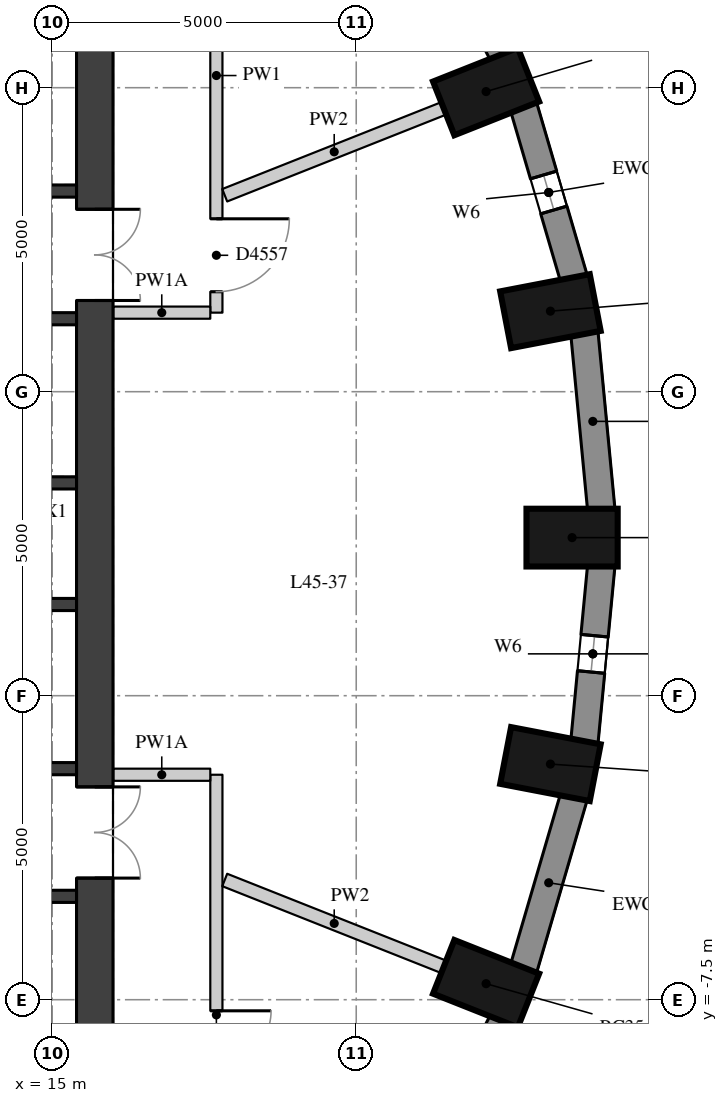
"""IFC4 building model, lengths in metres.
Left out: names, types, materials, properties, quantities, classifications, styles, units other than length and angle.
Written with IfcOpenShell. Run it as: python <this file> out.ifc"""

import sys

from ifc_helpers import new_model, si_unit, direction, frame, frame_2d, origin, origin_2d, place, context, subcontext, project, spatial, rectangle, extrude, element, fill, save


model = new_model("IFC4")
c1 = context("Model", 3, precision=1e-05, world=origin(), true_north=direction((0.0, 1.0)))
c2 = subcontext(c1, "Body", "Model", "MODEL_VIEW")
j1 = project(units=[si_unit("LENGTHUNIT", "METRE"), si_unit("PLANEANGLEUNIT", "RADIAN")], contexts=[c1])
p1 = place(None, origin())
s1 = spatial("IfcSite", under=j1, at=p1, CompositionType="ELEMENT")
p2 = place(p1, origin())
s2 = spatial("IfcBuilding", under=s1, at=p2, CompositionType="ELEMENT")
p3 = place(p2, frame((0.0, 0.0, 161.6)))
s3 = spatial("IfcBuildingStorey", under=s2, at=p3, CompositionType="ELEMENT", Elevation=161.6)
for number, where, z_axis, x_axis in (
    (1, (23.55, 0.1, 0.0), (0.0, 0.0, 1.0), (1.0, 0.0, 0.0)),
    (2, (23.194, 3.825, 0.0), (0.0, 0.0, 1.0), (0.982, 0.189, 0.0)),
    (3, (22.136, 7.436, 0.0), (0.0, 0.0, 1.0), (0.93, 0.369, 0.0)),
    (4, (22.136, -7.236, 0.0), (0.0, 0.0, 1.0), (0.93, -0.369, 0.0)),
    (5, (23.194, -3.625, 0.0), (0.0, 0.0, 1.0), (0.982, -0.189, 0.0)),
):
    element("IfcColumn", number, at=place(p3, frame(where, z_axis=z_axis, x_axis=x_axis)), inside=s3, PredefinedType="COLUMN", context=c2, shape_type="SweptSolid", body=[
        extrude(rectangle(XDim=1.5, YDim=0.95, at=origin_2d()), origin(), (0.0, 0.0, 1.0), 3.3),
    ])
p4 = place(p3, frame((24.031, 0.555, 0.0), z_axis=(0.0, 0.0, 1.0), x_axis=(-0.095265737322, 0.995451876935, 0.0)))
e6 = element("IfcWall", 6, at=p4, inside=s3, PredefinedType="SOLIDWALL", context=c2, shape_type="SweptSolid", body=[
    extrude(rectangle(XDim=2.927, YDim=0.45, at=frame_2d((1.463, 0.0))), origin(), (0.0, 0.0, 1.0), 3.02),
])
p5 = place(p3, frame((23.58, 4.362, 0.0), z_axis=(0.0, 0.0, 1.0), x_axis=(-0.281049481624, 0.959693278542, 0.0)))
e7 = element("IfcWall", 7, at=p5, inside=s3, PredefinedType="SOLIDWALL", context=c2, shape_type="SweptSolid", body=[
    extrude(rectangle(XDim=2.948, YDim=0.45, at=frame_2d((1.474, 0.0))), origin(), (0.0, 0.0, 1.0), 3.02),
])
p6 = place(p5, frame((1.174, 0.0, 0.4)))
e8 = element("IfcOpeningElement", 8, at=p6, cuts=e7, PredefinedType="OPENING", context=c2, shape_type="SweptSolid", body=[
    extrude(rectangle(XDim=0.6, YDim=1.75, at=frame_2d((0.3, 0.875))), frame((0.0, 0.235, 0.0), z_axis=(0.0, -1.0, 0.0), x_axis=(1.0, 0.0, 0.0)), (0.0, 0.0, 1.0), 0.47),
])
p7 = place(p3, frame((22.415, 8.037, 0.0), z_axis=(0.0, 0.0, 1.0), x_axis=(-0.454133999889, 0.890933392653, 0.0)))
e9 = element("IfcWall", 9, at=p7, inside=s3, PredefinedType="SOLIDWALL", context=c2, shape_type="SweptSolid", body=[
    extrude(rectangle(XDim=2.986, YDim=0.45, at=frame_2d((1.493, 0.0))), origin(), (0.0, 0.0, 1.0), 3.02),
])
p8 = place(p3, frame((21.059, -10.497, 0.0), z_axis=(0.0, 0.0, 1.0), x_axis=(0.454133999889, 0.890933392653, 0.0)))
e10 = element("IfcWall", 10, at=p8, inside=s3, PredefinedType="SOLIDWALL", context=c2, shape_type="SweptSolid", body=[
    extrude(rectangle(XDim=2.986, YDim=0.45, at=frame_2d((1.493, 0.0))), origin(), (0.0, 0.0, 1.0), 3.02),
])
p9 = place(p8, frame((1.193, 0.0, 0.4)))
e11 = element("IfcOpeningElement", 11, at=p9, cuts=e10, PredefinedType="OPENING", context=c2, shape_type="SweptSolid", body=[
    extrude(rectangle(XDim=0.6, YDim=1.75, at=frame_2d((0.3, 0.875))), frame((0.0, 0.235, 0.0), z_axis=(0.0, -1.0, 0.0), x_axis=(1.0, 0.0, 0.0)), (0.0, 0.0, 1.0), 0.47),
])
p10 = place(p3, frame((22.751, -6.991, 0.0), z_axis=(0.0, 0.0, 1.0), x_axis=(0.281049481624, 0.959693278542, 0.0)))
e12 = element("IfcWall", 12, at=p10, inside=s3, PredefinedType="SOLIDWALL", context=c2, shape_type="SweptSolid", body=[
    extrude(rectangle(XDim=2.948, YDim=0.45, at=frame_2d((1.474, 0.0))), origin(), (0.0, 0.0, 1.0), 3.02),
])
p11 = place(p3, frame((23.752, -3.269, 0.0), z_axis=(0.0, 0.0, 1.0), x_axis=(0.095257827044, 0.995452633924, 0.0)))
e13 = element("IfcWall", 13, at=p11, inside=s3, PredefinedType="SOLIDWALL", context=c2, shape_type="SweptSolid", body=[
    extrude(rectangle(XDim=2.927, YDim=0.45, at=frame_2d((1.463, 0.0))), origin(), (0.0, 0.0, 1.0), 3.02),
])
p12 = place(p11, frame((1.163, 0.0, 0.4)))
e14 = element("IfcOpeningElement", 14, at=p12, cuts=e13, PredefinedType="OPENING", context=c2, shape_type="SweptSolid", body=[
    extrude(rectangle(XDim=0.6, YDim=1.75, at=frame_2d((0.3, 0.875))), frame((0.0, 0.235, 0.0), z_axis=(0.0, -1.0, 0.0), x_axis=(1.0, 0.0, 0.0)), (0.0, 0.0, 1.0), 0.47),
])
p13 = place(p3, frame((15.7, -9.4, 0.0), z_axis=(0.0, 0.0, 1.0), x_axis=(0.0, 1.0, 0.0)))
e15 = element("IfcWall", 15, at=p13, inside=s3, PredefinedType="SHEAR", context=c2, shape_type="SweptSolid", body=[
    extrude(rectangle(XDim=18.8, YDim=0.6, at=frame_2d((9.4, 0.0))), origin(), (0.0, 0.0, 1.0), 3.02),
])
p14 = place(p13, frame((13.4, 0.0, 0.0)))
e16 = element("IfcOpeningElement", 16, at=p14, cuts=e15, PredefinedType="OPENING", context=c2, shape_type="SweptSolid", body=[
    extrude(rectangle(XDim=1.5, YDim=2.1, at=frame_2d((0.75, 1.05))), frame((0.0, 0.31, 0.0), z_axis=(0.0, -1.0, 0.0), x_axis=(1.0, 0.0, 0.0)), (0.0, 0.0, 1.0), 0.62),
])
p15 = place(p13, frame((3.9, 0.0, 0.0)))
e17 = element("IfcOpeningElement", 17, at=p15, cuts=e15, PredefinedType="OPENING", context=c2, shape_type="SweptSolid", body=[
    extrude(rectangle(XDim=1.5, YDim=2.1, at=frame_2d((0.75, 1.05))), frame((0.0, 0.31, 0.0), z_axis=(0.0, -1.0, 0.0), x_axis=(1.0, 0.0, 0.0)), (0.0, 0.0, 1.0), 0.62),
])
p16 = place(p3, frame((4.6, 5.8, 0.0), z_axis=(0.0, 0.0, 1.0), x_axis=(1.0, 0.0, 0.0)))
e18 = element("IfcWall", 18, at=p16, inside=s3, PredefinedType="SHEAR", context=c2, shape_type="SweptSolid", body=[
    extrude(rectangle(XDim=10.8, YDim=0.2, at=frame_2d((5.4, 0.0))), origin(), (0.0, 0.0, 1.0), 3.02),
])
p17 = place(p16, frame((7.05, 0.0, 0.0)))
e19 = element("IfcOpeningElement", 19, at=p17, cuts=e18, PredefinedType="OPENING", context=c2, shape_type="SweptSolid", body=[
    extrude(rectangle(XDim=1.1, YDim=2.1, at=frame_2d((0.55, 1.05))), frame((0.0, 0.11, 0.0), z_axis=(0.0, -1.0, 0.0), x_axis=(1.0, 0.0, 0.0)), (0.0, 0.0, 1.0), 0.22),
])
p18 = place(p16, frame((9.05, 0.0, 0.0)))
e20 = element("IfcOpeningElement", 20, at=p18, cuts=e18, PredefinedType="OPENING", context=c2, shape_type="SweptSolid", body=[
    extrude(rectangle(XDim=1.1, YDim=2.1, at=frame_2d((0.55, 1.05))), frame((0.0, 0.11, 0.0), z_axis=(0.0, -1.0, 0.0), x_axis=(1.0, 0.0, 0.0)), (0.0, 0.0, 1.0), 0.22),
])
p19 = place(p3, frame((4.6, 3.7, 0.0), z_axis=(0.0, 0.0, 1.0), x_axis=(1.0, 0.0, 0.0)))
e21 = element("IfcWall", 21, at=p19, inside=s3, PredefinedType="SHEAR", context=c2, shape_type="SweptSolid", body=[
    extrude(rectangle(XDim=10.8, YDim=0.2, at=frame_2d((5.4, 0.0))), origin(), (0.0, 0.0, 1.0), 3.02),
])
p20 = place(p19, frame((6.6, 0.0, 0.0)))
e22 = element("IfcOpeningElement", 22, at=p20, cuts=e21, PredefinedType="OPENING", context=c2, shape_type="SweptSolid", body=[
    extrude(rectangle(XDim=1.1, YDim=2.1, at=frame_2d((0.55, 1.05))), frame((0.0, 0.11, 0.0), z_axis=(0.0, -1.0, 0.0), x_axis=(1.0, 0.0, 0.0)), (0.0, 0.0, 1.0), 0.22),
])
p21 = place(p19, frame((8.9, 0.0, 0.0)))
e23 = element("IfcOpeningElement", 23, at=p21, cuts=e21, PredefinedType="OPENING", context=c2, shape_type="SweptSolid", body=[
    extrude(rectangle(XDim=1.1, YDim=2.1, at=frame_2d((0.55, 1.05))), frame((0.0, 0.11, 0.0), z_axis=(0.0, -1.0, 0.0), x_axis=(1.0, 0.0, 0.0)), (0.0, 0.0, 1.0), 0.22),
])
for number, where, z_axis, x_axis in (
    (24, (4.6, 1.0, 0.0), (0.0, 0.0, 1.0), (1.0, 0.0, 0.0)),
    (25, (4.6, -1.0, 0.0), (0.0, 0.0, 1.0), (1.0, 0.0, 0.0)),
):
    element("IfcWall", number, at=place(p3, frame(where, z_axis=z_axis, x_axis=x_axis)), inside=s3, PredefinedType="SHEAR", context=c2, shape_type="SweptSolid", body=[
        extrude(rectangle(XDim=10.8, YDim=0.2, at=frame_2d((5.4, 0.0))), origin(), (0.0, 0.0, 1.0), 3.02),
    ])
p22 = place(p3, frame((4.6, -3.7, 0.0), z_axis=(0.0, 0.0, 1.0), x_axis=(1.0, 0.0, 0.0)))
e26 = element("IfcWall", 26, at=p22, inside=s3, PredefinedType="SHEAR", context=c2, shape_type="SweptSolid", body=[
    extrude(rectangle(XDim=10.8, YDim=0.2, at=frame_2d((5.4, 0.0))), origin(), (0.0, 0.0, 1.0), 3.02),
])
p23 = place(p22, frame((6.6, 0.0, 0.0)))
e27 = element("IfcOpeningElement", 27, at=p23, cuts=e26, PredefinedType="OPENING", context=c2, shape_type="SweptSolid", body=[
    extrude(rectangle(XDim=1.1, YDim=2.1, at=frame_2d((0.55, 1.05))), frame((0.0, 0.11, 0.0), z_axis=(0.0, -1.0, 0.0), x_axis=(1.0, 0.0, 0.0)), (0.0, 0.0, 1.0), 0.22),
])
p24 = place(p22, frame((8.9, 0.0, 0.0)))
e28 = element("IfcOpeningElement", 28, at=p24, cuts=e26, PredefinedType="OPENING", context=c2, shape_type="SweptSolid", body=[
    extrude(rectangle(XDim=1.1, YDim=2.1, at=frame_2d((0.55, 1.05))), frame((0.0, 0.11, 0.0), z_axis=(0.0, -1.0, 0.0), x_axis=(1.0, 0.0, 0.0)), (0.0, 0.0, 1.0), 0.22),
])
p25 = place(p3, frame((4.6, -5.8, 0.0), z_axis=(0.0, 0.0, 1.0), x_axis=(1.0, 0.0, 0.0)))
e29 = element("IfcWall", 29, at=p25, inside=s3, PredefinedType="SHEAR", context=c2, shape_type="SweptSolid", body=[
    extrude(rectangle(XDim=10.8, YDim=0.2, at=frame_2d((5.4, 0.0))), origin(), (0.0, 0.0, 1.0), 3.02),
])
p26 = place(p3, frame((17.7, -3.8, 0.0), z_axis=(0.0, 0.0, 1.0), x_axis=(0.0, -1.0, 0.0)))
e30 = element("IfcWall", 30, at=p26, inside=s3, PredefinedType="PARTITIONING", context=c2, shape_type="SweptSolid", body=[
    extrude(rectangle(XDim=7.9, YDim=0.2, at=frame_2d((3.95, 0.0))), origin(), (0.0, 0.0, 1.0), 3.02),
])
p27 = place(p26, frame((3.883, 0.0, 0.0)))
e31 = element("IfcOpeningElement", 31, at=p27, cuts=e30, PredefinedType="OPENING", context=c2, shape_type="SweptSolid", body=[
    extrude(rectangle(XDim=1.8, YDim=2.1, at=frame_2d((0.9, 1.05))), frame((0.0, 0.11, 0.0), z_axis=(0.0, -1.0, 0.0), x_axis=(1.0, 0.0, 0.0)), (0.0, 0.0, 1.0), 0.22),
])
p28 = place(p3, frame((17.7, 11.6, 0.0), z_axis=(0.0, 0.0, 1.0), x_axis=(0.0, -1.0, 0.0)))
e32 = element("IfcWall", 32, at=p28, inside=s3, PredefinedType="PARTITIONING", context=c2, shape_type="SweptSolid", body=[
    extrude(rectangle(XDim=7.8, YDim=0.2, at=frame_2d((3.9, 0.0))), origin(), (0.0, 0.0, 1.0), 3.02),
])
p29 = place(p28, frame((6.256, 0.0, 0.0)))
e33 = element("IfcOpeningElement", 33, at=p29, cuts=e32, PredefinedType="OPENING", context=c2, shape_type="SweptSolid", body=[
    extrude(rectangle(XDim=1.2, YDim=2.1, at=frame_2d((0.6, 1.05))), frame((0.0, 0.11, 0.0), z_axis=(0.0, -1.0, 0.0), x_axis=(1.0, 0.0, 0.0)), (0.0, 0.0, 1.0), 0.22),
])
for number, where, z_axis, x_axis in (
    (34, (17.6, 3.8, 0.0), (0.0, 0.0, 1.0), (-1.0, 0.0, 0.0)),
    (35, (16.004, -3.8, 0.0), (0.0, 0.0, 1.0), (1.0, 0.0, 0.0)),
):
    element("IfcWall", number, at=place(p3, frame(where, z_axis=z_axis, x_axis=x_axis)), inside=s3, PredefinedType="PARTITIONING", context=c2, shape_type="SweptSolid", body=[
        extrude(rectangle(XDim=1.596, YDim=0.2, at=frame_2d((0.798, 0.0))), origin(), (0.0, 0.0, 1.0), 2.57),
    ])
for number, where, z_axis, x_axis in (
    (36, (21.439, 7.16, 0.0), (0.0, 0.0, 1.0), (-0.93, -0.369, 0.0)),
    (37, (21.439, -6.96, 0.0), (0.0, 0.0, 1.0), (-0.93, 0.369, 0.0)),
):
    element("IfcWall", number, at=place(p3, frame(where, z_axis=z_axis, x_axis=x_axis)), inside=s3, PredefinedType="PARTITIONING", context=c2, shape_type="SweptSolid", body=[
        extrude(rectangle(XDim=3.875, YDim=0.22, at=frame_2d((1.938, 0.0))), origin(), (0.0, 0.0, 1.0), 3.02),
    ])
p30 = place(p6, origin())
e38 = element("IfcWindow", 38, at=p30, inside=s3, PartitioningType="SINGLE_PANEL", PredefinedType="WINDOW", context=c2, shape_type="SweptSolid", body=[
    extrude(rectangle(XDim=0.6, YDim=1.75, at=frame_2d((0.3, 0.875))), frame((0.0, 0.035, 0.0), z_axis=(0.0, -1.0, 0.0), x_axis=(1.0, 0.0, 0.0)), (0.0, 0.0, 1.0), 0.06),
])
fill(e8, e38)
p31 = place(p12, origin())
e39 = element("IfcWindow", 39, at=p31, inside=s3, PartitioningType="SINGLE_PANEL", PredefinedType="WINDOW", context=c2, shape_type="SweptSolid", body=[
    extrude(rectangle(XDim=0.6, YDim=1.75, at=frame_2d((0.3, 0.875))), frame((0.0, 0.035, 0.0), z_axis=(0.0, -1.0, 0.0), x_axis=(1.0, 0.0, 0.0)), (0.0, 0.0, 1.0), 0.06),
])
fill(e14, e39)
p32 = place(p14, origin())
e40 = element("IfcDoor", 40, at=p32, inside=s3, OperationType="DOUBLE_DOOR_SINGLE_SWING", PredefinedType="DOOR", context=c2, shape_type="SweptSolid", body=[
    extrude(rectangle(XDim=1.5, YDim=2.1, at=frame_2d((0.75, 1.05))), frame((0.0, 0.025, 0.0), z_axis=(0.0, -1.0, 0.0), x_axis=(1.0, 0.0, 0.0)), (0.0, 0.0, 1.0), 0.05),
])
fill(e16, e40)
p33 = place(p15, origin())
e41 = element("IfcDoor", 41, at=p33, inside=s3, OperationType="DOUBLE_DOOR_SINGLE_SWING", PredefinedType="DOOR", context=c2, shape_type="SweptSolid", body=[
    extrude(rectangle(XDim=1.5, YDim=2.1, at=frame_2d((0.75, 1.05))), frame((0.0, 0.025, 0.0), z_axis=(0.0, -1.0, 0.0), x_axis=(1.0, 0.0, 0.0)), (0.0, 0.0, 1.0), 0.05),
])
fill(e17, e41)
p34 = place(p27, origin())
e42 = element("IfcDoor", 42, at=p34, inside=s3, OperationType="DOUBLE_DOOR_SINGLE_SWING", PredefinedType="DOOR", context=c2, shape_type="SweptSolid", body=[
    extrude(rectangle(XDim=1.8, YDim=2.1, at=frame_2d((0.9, 1.05))), frame((0.0, 0.025, 0.0), z_axis=(0.0, -1.0, 0.0), x_axis=(1.0, 0.0, 0.0)), (0.0, 0.0, 1.0), 0.05),
])
fill(e31, e42)
p35 = place(p29, origin())
e43 = element("IfcDoor", 43, at=p35, inside=s3, OperationType="SINGLE_SWING_LEFT", PredefinedType="DOOR", context=c2, shape_type="SweptSolid", body=[
    extrude(rectangle(XDim=1.2, YDim=2.1, at=frame_2d((0.6, 1.05))), frame((0.0, 0.025, 0.0), z_axis=(0.0, -1.0, 0.0), x_axis=(1.0, 0.0, 0.0)), (0.0, 0.0, 1.0), 0.05),
])
fill(e33, e43)
save(model, sys.argv[1])
